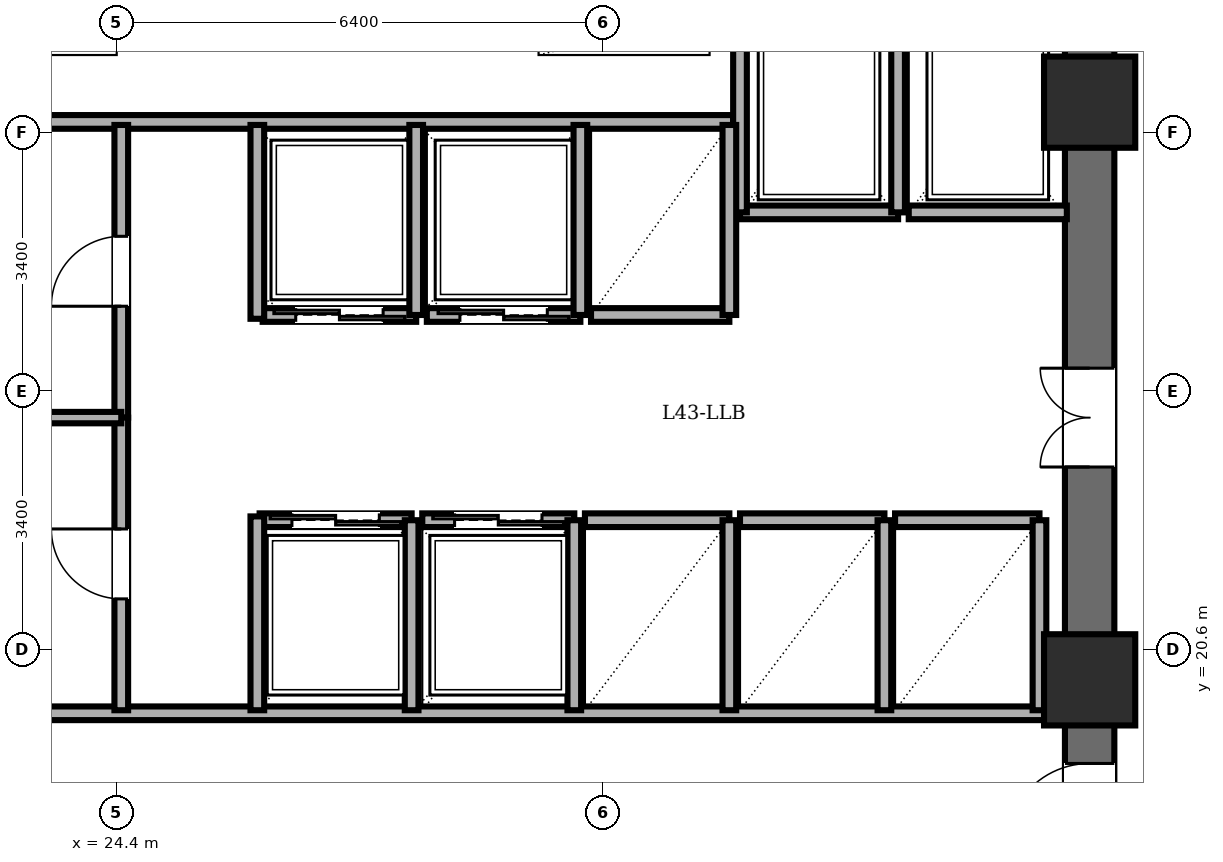
"""IFC4 building model, lengths in metres.
Left out: names, types, materials, properties, quantities, classifications, styles, units other than length and angle.
Written with IfcOpenShell. Run it as: python <this file> out.ifc"""

import sys

from ifc_helpers import new_model, si_unit, direction, frame, frame_2d, origin, origin_2d, place, context, subcontext, project, spatial, rectangle, extrude, element, fill, save


model = new_model("IFC4")
c1 = context("Model", 3, precision=1e-05, world=origin(), true_north=direction((0.0, 1.0)))
c2 = subcontext(c1, "Body", "Model", "MODEL_VIEW")
j1 = project(units=[si_unit("LENGTHUNIT", "METRE"), si_unit("PLANEANGLEUNIT", "RADIAN")], contexts=[c1])
p1 = place(None, origin())
s1 = spatial("IfcSite", under=j1, at=p1, CompositionType="ELEMENT")
p2 = place(p1, origin())
s2 = spatial("IfcBuilding", under=s1, at=p2, CompositionType="ELEMENT")
p3 = place(p2, frame((0.0, 0.0, 165.4)))
s3 = spatial("IfcBuildingStorey", under=s2, at=p3, CompositionType="ELEMENT", Elevation=165.4)
for number, where, z_axis, x_axis in (
    (1, (37.2, 20.2, 0.0), (0.0, 0.0, 1.0), (1.0, 0.0, 0.0)),
    (2, (37.2, 27.8, 0.0), (0.0, 0.0, 1.0), (1.0, 0.0, 0.0)),
):
    element("IfcColumn", number, at=place(p3, frame(where, z_axis=z_axis, x_axis=x_axis)), inside=s3, PredefinedType="COLUMN", context=c2, shape_type="SweptSolid", body=[
        extrude(rectangle(XDim=1.2, YDim=1.2, at=origin_2d()), origin(), (0.0, 0.0, 1.0), 3.6),
    ])
p4 = place(p3, frame((37.2, 14.4, 0.0), z_axis=(0.0, 0.0, 1.0), x_axis=(0.0, 1.0, 0.0)))
e3 = element("IfcWall", 3, at=p4, inside=s3, PredefinedType="SHEAR", context=c2, shape_type="SweptSolid", body=[
    extrude(rectangle(XDim=19.2, YDim=0.65, at=frame_2d((9.6, 0.0))), origin(), (0.0, 0.0, 1.0), 3.4),
])
p5 = place(p4, frame((15.8, 0.0, 0.0)))
e4 = element("IfcOpeningElement", 4, at=p5, cuts=e3, PredefinedType="OPENING", context=c2, shape_type="SweptSolid", body=[
    extrude(rectangle(XDim=1.15, YDim=2.15, at=frame_2d((0.575, 1.075))), frame((0.0, 0.335, 0.0), z_axis=(0.0, -1.0, 0.0), x_axis=(1.0, 0.0, 0.0)), (0.0, 0.0, 1.0), 0.67),
])
p6 = place(p4, frame((3.6, 0.0, 0.0)))
e5 = element("IfcOpeningElement", 5, at=p6, cuts=e3, PredefinedType="OPENING", context=c2, shape_type="SweptSolid", body=[
    extrude(rectangle(XDim=1.1, YDim=2.15, at=frame_2d((0.55, 1.075))), frame((0.0, 0.335, 0.0), z_axis=(0.0, -1.0, 0.0), x_axis=(1.0, 0.0, 0.0)), (0.0, 0.0, 1.0), 0.67),
])
p7 = place(p4, frame((8.6, 0.0, 0.0)))
e6 = element("IfcOpeningElement", 6, at=p7, cuts=e3, PredefinedType="OPENING", context=c2, shape_type="SweptSolid", body=[
    extrude(rectangle(XDim=1.3, YDim=2.2, at=frame_2d((0.65, 1.1))), frame((0.0, 0.335, 0.0), z_axis=(0.0, -1.0, 0.0), x_axis=(1.0, 0.0, 0.0)), (0.0, 0.0, 1.0), 0.67),
])
p8 = place(p3, frame((21.95, 27.54, 0.0), z_axis=(0.0, 0.0, 1.0), x_axis=(1.0, 0.0, 0.0)))
e7 = element("IfcWall", 7, at=p8, inside=s3, PredefinedType="PARTITIONING", context=c2, shape_type="SweptSolid", body=[
    extrude(rectangle(XDim=10.56, YDim=0.18, at=frame_2d((5.28, 0.0))), origin(), (0.0, 0.0, 1.0), 3.4),
])
p9 = place(p3, frame((21.95, 19.76, 0.0), z_axis=(0.0, 0.0, 1.0), x_axis=(1.0, 0.0, 0.0)))
e8 = element("IfcWall", 8, at=p9, inside=s3, PredefinedType="PARTITIONING", context=c2, shape_type="SweptSolid", body=[
    extrude(rectangle(XDim=14.87, YDim=0.18, at=frame_2d((7.435, 0.0))), origin(), (0.0, 0.0, 1.0), 3.4),
])
p10 = place(p3, frame((34.68, 26.35, 0.0), z_axis=(0.0, 0.0, 1.0), x_axis=(-1.0, 0.0, 0.0)))
e9 = element("IfcWall", 9, at=p10, inside=s3, PredefinedType="PARTITIONING", context=c2, shape_type="SweptSolid", body=[
    extrude(rectangle(XDim=2.08, YDim=0.18, at=frame_2d((1.04, 0.0))), origin(), (0.0, 0.0, 1.0), 3.4),
])
for number, where, z_axis, x_axis in (
    (10, (34.68, 26.35, 0.0), (0.0, 0.0, 1.0), (0.0, 1.0, 0.0)),
    (11, (32.6, 29.08, 0.0), (0.0, 0.0, 1.0), (0.0, -1.0, 0.0)),
):
    element("IfcWall", number, at=place(p3, frame(where, z_axis=z_axis, x_axis=x_axis)), inside=s3, PredefinedType="PARTITIONING", context=c2, shape_type="SweptSolid", body=[
        extrude(rectangle(XDim=2.73, YDim=0.18, at=frame_2d((1.365, 0.0))), origin(), (0.0, 0.0, 1.0), 3.4),
    ])
p11 = place(p3, frame((36.9, 26.35, 0.0), z_axis=(0.0, 0.0, 1.0), x_axis=(-1.0, 0.0, 0.0)))
e12 = element("IfcWall", 12, at=p11, inside=s3, PredefinedType="PARTITIONING", context=c2, shape_type="SweptSolid", body=[
    extrude(rectangle(XDim=2.08, YDim=0.18, at=frame_2d((1.04, 0.0))), origin(), (0.0, 0.0, 1.0), 3.4),
])
p12 = place(p3, frame((28.34, 25.0, 0.0), z_axis=(0.0, 0.0, 1.0), x_axis=(-1.0, 0.0, 0.0)))
e13 = element("IfcWall", 13, at=p12, inside=s3, PredefinedType="PARTITIONING", context=c2, shape_type="SweptSolid", body=[
    extrude(rectangle(XDim=2.02, YDim=0.18, at=frame_2d((1.01, 0.0))), origin(), (0.0, 0.0, 1.0), 3.4),
])
p13 = place(p12, frame((0.435, 0.0, 0.0)))
e14 = element("IfcOpeningElement", 14, at=p13, cuts=e13, PredefinedType="OPENING", context=c2, shape_type="SweptSolid", body=[
    extrude(rectangle(XDim=1.15, YDim=2.2, at=frame_2d((0.575, 1.1))), frame((0.0, 0.1, 0.0), z_axis=(0.0, -1.0, 0.0), x_axis=(1.0, 0.0, 0.0)), (0.0, 0.0, 1.0), 0.2),
])
p14 = place(p3, frame((28.34, 25.0, 0.0), z_axis=(0.0, 0.0, 1.0), x_axis=(0.0, 1.0, 0.0)))
e15 = element("IfcWall", 15, at=p14, inside=s3, PredefinedType="PARTITIONING", context=c2, shape_type="SweptSolid", body=[
    extrude(rectangle(XDim=2.5, YDim=0.18, at=frame_2d((1.25, 0.0))), origin(), (0.0, 0.0, 1.0), 3.4),
])
p15 = place(p3, frame((30.5, 25.0, 0.0), z_axis=(0.0, 0.0, 1.0), x_axis=(-1.0, 0.0, 0.0)))
e16 = element("IfcWall", 16, at=p15, inside=s3, PredefinedType="PARTITIONING", context=c2, shape_type="SweptSolid", body=[
    extrude(rectangle(XDim=2.02, YDim=0.18, at=frame_2d((1.01, 0.0))), origin(), (0.0, 0.0, 1.0), 3.4),
])
p16 = place(p15, frame((0.435, 0.0, 0.0)))
e17 = element("IfcOpeningElement", 17, at=p16, cuts=e16, PredefinedType="OPENING", context=c2, shape_type="SweptSolid", body=[
    extrude(rectangle(XDim=1.15, YDim=2.2, at=frame_2d((0.575, 1.1))), frame((0.0, 0.1, 0.0), z_axis=(0.0, -1.0, 0.0), x_axis=(1.0, 0.0, 0.0)), (0.0, 0.0, 1.0), 0.2),
])
p17 = place(p3, frame((30.5, 25.0, 0.0), z_axis=(0.0, 0.0, 1.0), x_axis=(0.0, 1.0, 0.0)))
e18 = element("IfcWall", 18, at=p17, inside=s3, PredefinedType="PARTITIONING", context=c2, shape_type="SweptSolid", body=[
    extrude(rectangle(XDim=2.5, YDim=0.18, at=frame_2d((1.25, 0.0))), origin(), (0.0, 0.0, 1.0), 3.4),
])
p18 = place(p3, frame((26.28, 22.3, 0.0), z_axis=(0.0, 0.0, 1.0), x_axis=(1.0, 0.0, 0.0)))
e19 = element("IfcWall", 19, at=p18, inside=s3, PredefinedType="PARTITIONING", context=c2, shape_type="SweptSolid", body=[
    extrude(rectangle(XDim=2.0, YDim=0.18, at=frame_2d((1.0, 0.0))), origin(), (0.0, 0.0, 1.0), 3.4),
])
p19 = place(p18, frame((0.425, 0.0, 0.0)))
e20 = element("IfcOpeningElement", 20, at=p19, cuts=e19, PredefinedType="OPENING", context=c2, shape_type="SweptSolid", body=[
    extrude(rectangle(XDim=1.15, YDim=2.2, at=frame_2d((0.575, 1.1))), frame((0.0, 0.1, 0.0), z_axis=(0.0, -1.0, 0.0), x_axis=(1.0, 0.0, 0.0)), (0.0, 0.0, 1.0), 0.2),
])
p20 = place(p3, frame((28.28, 19.8, 0.0), z_axis=(0.0, 0.0, 1.0), x_axis=(0.0, 1.0, 0.0)))
e21 = element("IfcWall", 21, at=p20, inside=s3, PredefinedType="PARTITIONING", context=c2, shape_type="SweptSolid", body=[
    extrude(rectangle(XDim=2.5, YDim=0.18, at=frame_2d((1.25, 0.0))), origin(), (0.0, 0.0, 1.0), 3.4),
])
p21 = place(p3, frame((28.42, 22.3, 0.0), z_axis=(0.0, 0.0, 1.0), x_axis=(1.0, 0.0, 0.0)))
e22 = element("IfcWall", 22, at=p21, inside=s3, PredefinedType="PARTITIONING", context=c2, shape_type="SweptSolid", body=[
    extrude(rectangle(XDim=2.0, YDim=0.18, at=frame_2d((1.0, 0.0))), origin(), (0.0, 0.0, 1.0), 3.4),
])
p22 = place(p21, frame((0.425, 0.0, 0.0)))
e23 = element("IfcOpeningElement", 23, at=p22, cuts=e22, PredefinedType="OPENING", context=c2, shape_type="SweptSolid", body=[
    extrude(rectangle(XDim=1.15, YDim=2.2, at=frame_2d((0.575, 1.1))), frame((0.0, 0.1, 0.0), z_axis=(0.0, -1.0, 0.0), x_axis=(1.0, 0.0, 0.0)), (0.0, 0.0, 1.0), 0.2),
])
p23 = place(p3, frame((30.42, 19.8, 0.0), z_axis=(0.0, 0.0, 1.0), x_axis=(0.0, 1.0, 0.0)))
e24 = element("IfcWall", 24, at=p23, inside=s3, PredefinedType="PARTITIONING", context=c2, shape_type="SweptSolid", body=[
    extrude(rectangle(XDim=2.5, YDim=0.18, at=frame_2d((1.25, 0.0))), origin(), (0.0, 0.0, 1.0), 3.4),
])
p24 = place(p3, frame((32.46, 25.0, 0.0), z_axis=(0.0, 0.0, 1.0), x_axis=(-1.0, 0.0, 0.0)))
e25 = element("IfcWall", 25, at=p24, inside=s3, PredefinedType="PARTITIONING", context=c2, shape_type="SweptSolid", body=[
    extrude(rectangle(XDim=1.82, YDim=0.18, at=frame_2d((0.91, 0.0))), origin(), (0.0, 0.0, 1.0), 3.4),
])
p25 = place(p3, frame((32.46, 25.0, 0.0), z_axis=(0.0, 0.0, 1.0), x_axis=(0.0, 1.0, 0.0)))
e26 = element("IfcWall", 26, at=p25, inside=s3, PredefinedType="PARTITIONING", context=c2, shape_type="SweptSolid", body=[
    extrude(rectangle(XDim=2.5, YDim=0.18, at=frame_2d((1.25, 0.0))), origin(), (0.0, 0.0, 1.0), 3.4),
])
p26 = place(p3, frame((30.56, 22.3, 0.0), z_axis=(0.0, 0.0, 1.0), x_axis=(1.0, 0.0, 0.0)))
e27 = element("IfcWall", 27, at=p26, inside=s3, PredefinedType="PARTITIONING", context=c2, shape_type="SweptSolid", body=[
    extrude(rectangle(XDim=1.9, YDim=0.18, at=frame_2d((0.95, 0.0))), origin(), (0.0, 0.0, 1.0), 3.4),
])
p27 = place(p3, frame((32.46, 19.8, 0.0), z_axis=(0.0, 0.0, 1.0), x_axis=(0.0, 1.0, 0.0)))
e28 = element("IfcWall", 28, at=p27, inside=s3, PredefinedType="PARTITIONING", context=c2, shape_type="SweptSolid", body=[
    extrude(rectangle(XDim=2.5, YDim=0.18, at=frame_2d((1.25, 0.0))), origin(), (0.0, 0.0, 1.0), 3.4),
])
p28 = place(p3, frame((32.6, 22.3, 0.0), z_axis=(0.0, 0.0, 1.0), x_axis=(1.0, 0.0, 0.0)))
e29 = element("IfcWall", 29, at=p28, inside=s3, PredefinedType="PARTITIONING", context=c2, shape_type="SweptSolid", body=[
    extrude(rectangle(XDim=1.9, YDim=0.18, at=frame_2d((0.95, 0.0))), origin(), (0.0, 0.0, 1.0), 3.4),
])
p29 = place(p3, frame((34.5, 19.8, 0.0), z_axis=(0.0, 0.0, 1.0), x_axis=(0.0, 1.0, 0.0)))
e30 = element("IfcWall", 30, at=p29, inside=s3, PredefinedType="PARTITIONING", context=c2, shape_type="SweptSolid", body=[
    extrude(rectangle(XDim=2.5, YDim=0.18, at=frame_2d((1.25, 0.0))), origin(), (0.0, 0.0, 1.0), 3.4),
])
p30 = place(p3, frame((34.64, 22.3, 0.0), z_axis=(0.0, 0.0, 1.0), x_axis=(1.0, 0.0, 0.0)))
e31 = element("IfcWall", 31, at=p30, inside=s3, PredefinedType="PARTITIONING", context=c2, shape_type="SweptSolid", body=[
    extrude(rectangle(XDim=1.9, YDim=0.18, at=frame_2d((0.95, 0.0))), origin(), (0.0, 0.0, 1.0), 3.4),
])
p31 = place(p3, frame((36.54, 19.8, 0.0), z_axis=(0.0, 0.0, 1.0), x_axis=(0.0, 1.0, 0.0)))
e32 = element("IfcWall", 32, at=p31, inside=s3, PredefinedType="PARTITIONING", context=c2, shape_type="SweptSolid", body=[
    extrude(rectangle(XDim=2.5, YDim=0.18, at=frame_2d((1.25, 0.0))), origin(), (0.0, 0.0, 1.0), 3.4),
])
p32 = place(p3, frame((24.46, 23.65, 0.0), z_axis=(0.0, 0.0, 1.0), x_axis=(0.0, 1.0, 0.0)))
e33 = element("IfcWall", 33, at=p32, inside=s3, PredefinedType="PARTITIONING", context=c2, shape_type="SweptSolid", body=[
    extrude(rectangle(XDim=3.85, YDim=0.18, at=frame_2d((1.925, 0.0))), origin(), (0.0, 0.0, 1.0), 3.4),
])
p33 = place(p32, frame((1.465, 0.0, 0.0)))
e34 = element("IfcOpeningElement", 34, at=p33, cuts=e33, PredefinedType="OPENING", context=c2, shape_type="SweptSolid", body=[
    extrude(rectangle(XDim=0.92, YDim=2.1, at=frame_2d((0.46, 1.05))), frame((0.0, 0.1, 0.0), z_axis=(0.0, -1.0, 0.0), x_axis=(1.0, 0.0, 0.0)), (0.0, 0.0, 1.0), 0.2),
])
p34 = place(p3, frame((24.46, 19.8, 0.0), z_axis=(0.0, 0.0, 1.0), x_axis=(0.0, 1.0, 0.0)))
e35 = element("IfcWall", 35, at=p34, inside=s3, PredefinedType="PARTITIONING", context=c2, shape_type="SweptSolid", body=[
    extrude(rectangle(XDim=3.85, YDim=0.18, at=frame_2d((1.925, 0.0))), origin(), (0.0, 0.0, 1.0), 3.4),
])
p35 = place(p34, frame((1.465, 0.0, 0.0)))
e36 = element("IfcOpeningElement", 36, at=p35, cuts=e35, PredefinedType="OPENING", context=c2, shape_type="SweptSolid", body=[
    extrude(rectangle(XDim=0.92, YDim=2.1, at=frame_2d((0.46, 1.05))), frame((0.0, 0.1, 0.0), z_axis=(0.0, -1.0, 0.0), x_axis=(1.0, 0.0, 0.0)), (0.0, 0.0, 1.0), 0.2),
])
p36 = place(p3, frame((21.95, 23.65, 0.0), z_axis=(0.0, 0.0, 1.0), x_axis=(1.0, 0.0, 0.0)))
e37 = element("IfcWall", 37, at=p36, inside=s3, PredefinedType="PARTITIONING", context=c2, shape_type="SweptSolid", body=[
    extrude(rectangle(XDim=2.51, YDim=0.15, at=frame_2d((1.255, 0.0))), origin(), (0.0, 0.0, 1.0), 3.4),
])
for number, where, z_axis, x_axis in (
    (38, (26.25, 24.95, 0.0), (0.0, 0.0, 1.0), (0.0, 1.0, 0.0)),
    (39, (26.25, 19.8, 0.0), (0.0, 0.0, 1.0), (0.0, 1.0, 0.0)),
):
    element("IfcWall", number, at=place(p3, frame(where, z_axis=z_axis, x_axis=x_axis)), inside=s3, PredefinedType="PARTITIONING", context=c2, shape_type="SweptSolid", body=[
        extrude(rectangle(XDim=2.55, YDim=0.18, at=frame_2d((1.275, 0.0))), origin(), (0.0, 0.0, 1.0), 3.4),
    ])
p37 = place(p6, origin())
e40 = element("IfcDoor", 40, at=p37, inside=s3, OperationType="SINGLE_SWING_LEFT", PredefinedType="DOOR", context=c2, shape_type="SweptSolid", body=[
    extrude(rectangle(XDim=1.1, YDim=2.15, at=frame_2d((0.55, 1.075))), frame((0.0, 0.025, 0.0), z_axis=(0.0, -1.0, 0.0), x_axis=(1.0, 0.0, 0.0)), (0.0, 0.0, 1.0), 0.05),
])
fill(e5, e40)
p38 = place(p13, origin())
e41 = element("IfcDoor", 41, at=p38, inside=s3, OperationType="DOUBLE_DOOR_SLIDING", PredefinedType="DOOR", context=c2, shape_type="SweptSolid", body=[
    extrude(rectangle(XDim=1.15, YDim=2.2, at=frame_2d((0.575, 1.1))), frame((0.0, 0.025, 0.0), z_axis=(0.0, -1.0, 0.0), x_axis=(1.0, 0.0, 0.0)), (0.0, 0.0, 1.0), 0.05),
])
fill(e14, e41)
p39 = place(p16, origin())
e42 = element("IfcDoor", 42, at=p39, inside=s3, OperationType="DOUBLE_DOOR_SLIDING", PredefinedType="DOOR", context=c2, shape_type="SweptSolid", body=[
    extrude(rectangle(XDim=1.15, YDim=2.2, at=frame_2d((0.575, 1.1))), frame((0.0, 0.025, 0.0), z_axis=(0.0, -1.0, 0.0), x_axis=(1.0, 0.0, 0.0)), (0.0, 0.0, 1.0), 0.05),
])
fill(e17, e42)
p40 = place(p19, origin())
e43 = element("IfcDoor", 43, at=p40, inside=s3, OperationType="DOUBLE_DOOR_SLIDING", PredefinedType="DOOR", context=c2, shape_type="SweptSolid", body=[
    extrude(rectangle(XDim=1.15, YDim=2.2, at=frame_2d((0.575, 1.1))), frame((0.0, 0.025, 0.0), z_axis=(0.0, -1.0, 0.0), x_axis=(1.0, 0.0, 0.0)), (0.0, 0.0, 1.0), 0.05),
])
fill(e20, e43)
p41 = place(p22, origin())
e44 = element("IfcDoor", 44, at=p41, inside=s3, OperationType="DOUBLE_DOOR_SLIDING", PredefinedType="DOOR", context=c2, shape_type="SweptSolid", body=[
    extrude(rectangle(XDim=1.15, YDim=2.2, at=frame_2d((0.575, 1.1))), frame((0.0, 0.025, 0.0), z_axis=(0.0, -1.0, 0.0), x_axis=(1.0, 0.0, 0.0)), (0.0, 0.0, 1.0), 0.05),
])
fill(e23, e44)
p42 = place(p33, origin())
e45 = element("IfcDoor", 45, at=p42, inside=s3, OperationType="SINGLE_SWING_LEFT", PredefinedType="DOOR", context=c2, shape_type="SweptSolid", body=[
    extrude(rectangle(XDim=0.92, YDim=2.1, at=frame_2d((0.46, 1.05))), frame((0.0, 0.025, 0.0), z_axis=(0.0, -1.0, 0.0), x_axis=(1.0, 0.0, 0.0)), (0.0, 0.0, 1.0), 0.05),
])
fill(e34, e45)
p43 = place(p35, origin())
e46 = element("IfcDoor", 46, at=p43, inside=s3, OperationType="SINGLE_SWING_RIGHT", PredefinedType="DOOR", context=c2, shape_type="SweptSolid", body=[
    extrude(rectangle(XDim=0.92, YDim=2.1, at=frame_2d((0.46, 1.05))), frame((0.0, 0.025, 0.0), z_axis=(0.0, -1.0, 0.0), x_axis=(1.0, 0.0, 0.0)), (0.0, 0.0, 1.0), 0.05),
])
fill(e36, e46)
p44 = place(p7, origin())
e47 = element("IfcDoor", 47, at=p44, inside=s3, OperationType="DOUBLE_DOOR_SINGLE_SWING", PredefinedType="DOOR", context=c2, shape_type="SweptSolid", body=[
    extrude(rectangle(XDim=1.3, YDim=2.2, at=frame_2d((0.65, 1.1))), frame((0.0, 0.025, 0.0), z_axis=(0.0, -1.0, 0.0), x_axis=(1.0, 0.0, 0.0)), (0.0, 0.0, 1.0), 0.05),
])
fill(e6, e47)
save(model, sys.argv[1])
